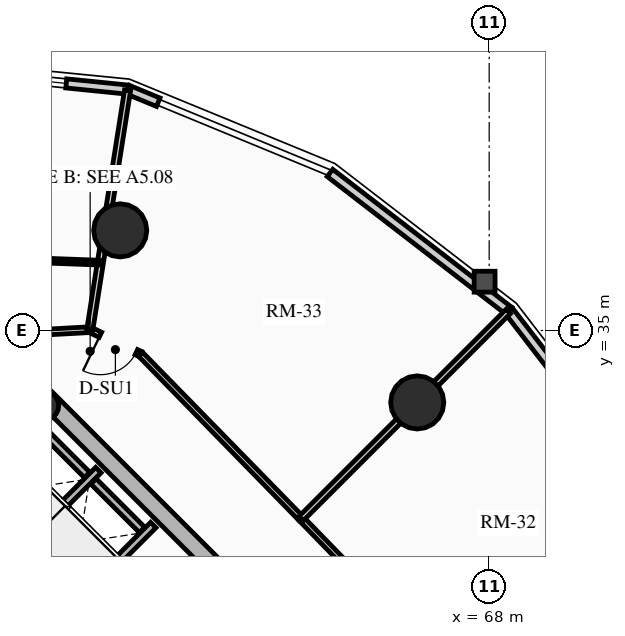
"""IFC4 building model, lengths in metres.
Left out: names, types, materials, properties, quantities, classifications, styles, units other than length and angle.
Written with IfcOpenShell. Run it as: python <this file> out.ifc"""

import sys

from ifc_helpers import new_model, si_unit, direction, frame, frame_2d, origin, origin_2d, place, context, subcontext, project, spatial, rectangle, circle, hollow_circle, extrude, source, transform, mapped, element, fill, save


model = new_model("IFC4")
c1 = context("Model", 3, precision=1e-05, world=origin(), true_north=direction((0.0, 1.0)))
c2 = subcontext(c1, "Body", "Model", "MODEL_VIEW")
j1 = project(units=[si_unit("LENGTHUNIT", "METRE"), si_unit("PLANEANGLEUNIT", "RADIAN")], contexts=[c1])
p1 = place(None, origin())
s1 = spatial("IfcSite", under=j1, at=p1, CompositionType="ELEMENT")
p2 = place(p1, origin())
s2 = spatial("IfcBuilding", under=s1, at=p2, CompositionType="ELEMENT")
p3 = place(p2, frame((0.0, 0.0, 90.52)))
s3 = spatial("IfcBuildingStorey", under=s2, at=p3, CompositionType="ELEMENT", Elevation=90.52)
p4 = place(p3, frame((66.303, 23.263, 0.0), z_axis=(0.0, 0.0, 1.0), x_axis=(-0.707106781187, 0.707106781187, 0.0)))
e1 = element("IfcWall", 1, at=p4, inside=s3, PredefinedType="SHEAR", context=c2, shape_type="SweptSolid", body=[
    extrude(rectangle(XDim=14.2, YDim=0.45, at=frame_2d((7.1, 0.0))), origin(), (0.0, 0.0, 1.0), 2.91),
])
p5 = place(p3, frame((48.856, 25.578, 0.0), z_axis=(0.0, 0.0, 1.0), x_axis=(0.707106781187, 0.707106781187, 0.0)))
e2 = element("IfcWall", 2, at=p5, inside=s3, PredefinedType="SHEAR", context=c2, shape_type="SweptSolid", body=[
    extrude(rectangle(XDim=10.7, YDim=0.45, at=frame_2d((5.35, 0.0))), origin(), (0.0, 0.0, 1.0), 2.91),
])
m1 = source(origin(), c2, "Body", "SweptSolid", [
    extrude(rectangle(XDim=1.5, YDim=2.02, at=frame_2d((0.75, 1.01))), frame((0.0, 0.235, 0.0), z_axis=(0.0, -1.0, 0.0), x_axis=(1.0, 0.0, 0.0)), (0.0, 0.0, 1.0), 0.47),
])
p6 = place(p5, frame((4.6, 0.0, 0.0)))
e3 = element("IfcOpeningElement", 3, at=p6, cuts=e2, PredefinedType="OPENING", context=c2, shape_type="MappedRepresentation", body=[
    mapped(m1, transform((0.0, 0.0, 0.0), x_axis=(1.0, 0.0, 0.0), y_axis=(0.0, 1.0, 0.0), z_axis=(0.0, 0.0, 1.0), scale=1.0)),
])
p7 = place(p3, frame((63.645, 20.922, 0.0), z_axis=(0.0, 0.0, 1.0), x_axis=(-0.707106781187, 0.707106781187, 0.0)))
e4 = element("IfcWall", 4, at=p7, inside=s3, PredefinedType="SHEAR", context=c2, shape_type="SweptSolid", body=[
    extrude(rectangle(XDim=13.75, YDim=0.35, at=frame_2d((6.875, 0.0))), origin(), (0.0, 0.0, 1.0), 2.91),
])
m2 = source(origin(), c2, "Body", "SweptSolid", [
    extrude(rectangle(XDim=1.1, YDim=2.015, at=frame_2d((0.55, 1.007))), frame((0.0, 0.185, 0.0), z_axis=(0.0, -1.0, 0.0), x_axis=(1.0, 0.0, 0.0)), (0.0, 0.0, 1.0), 0.37),
])
p8 = place(p7, frame((10.0, 0.0, 0.0)))
e5 = element("IfcOpeningElement", 5, at=p8, cuts=e4, PredefinedType="OPENING", context=c2, shape_type="MappedRepresentation", body=[
    mapped(m2, transform((0.0, 0.0, 0.0), x_axis=(1.0, 0.0, 0.0), y_axis=(0.0, 1.0, 0.0), z_axis=(0.0, 0.0, 1.0), scale=1.0)),
])
p9 = place(p7, frame((12.0, 0.0, 0.0)))
e6 = element("IfcOpeningElement", 6, at=p9, cuts=e4, PredefinedType="OPENING", context=c2, shape_type="MappedRepresentation", body=[
    mapped(m2, transform((0.0, 0.0, 0.0), x_axis=(1.0, 0.0, 0.0), y_axis=(0.0, 1.0, 0.0), z_axis=(0.0, 0.0, 1.0), scale=1.0)),
])
m3 = source(origin(), c2, "Body", "SweptSolid", [
    extrude(rectangle(XDim=1.15, YDim=2.02, at=frame_2d((0.575, 1.01))), frame((0.0, 0.185, 0.0), z_axis=(0.0, -1.0, 0.0), x_axis=(1.0, 0.0, 0.0)), (0.0, 0.0, 1.0), 0.37),
])
p10 = place(p7, frame((5.305, 0.0, 0.0)))
e7 = element("IfcOpeningElement", 7, at=p10, cuts=e4, PredefinedType="OPENING", context=c2, shape_type="MappedRepresentation", body=[
    mapped(m3, transform((0.0, 0.0, 0.0), x_axis=(1.0, 0.0, 0.0), y_axis=(0.0, 1.0, 0.0), z_axis=(0.0, 0.0, 1.0), scale=1.0)),
])
p11 = place(p3, frame((56.294, 33.024, 0.0), z_axis=(0.0, 0.0, 1.0), x_axis=(0.707106781187, 0.707106781187, 0.0)))
e8 = element("IfcColumn", 8, at=p11, inside=s3, PredefinedType="COLUMN", context=c2, shape_type="SweptSolid", body=[
    extrude(hollow_circle(Radius=0.38, WallThickness=0.032, at=origin_2d()), origin(), (0.0, 0.0, 1.0), 2.91),
])
for number, where, z_axis, x_axis in (
    (9, (66.107, 33.107, 0.0), (0.0, 0.0, 1.0), (1.0, 0.0, 0.0)),
    (10, (58.291, 37.635, 0.0), (0.0, 0.0, 1.0), (1.0, 0.0, 0.0)),
):
    element("IfcColumn", number, at=place(p3, frame(where, z_axis=z_axis, x_axis=x_axis)), inside=s3, PredefinedType="USERDEFINED", context=c2, shape_type="SweptSolid", body=[
        extrude(circle(Radius=0.7, at=origin_2d()), origin(), (0.0, 0.0, 1.0), 2.91),
    ])
p12 = place(p3, frame((63.811, 39.145, 0.0), z_axis=(0.0, 0.0, 1.0), x_axis=(0.791982052206, -0.61054437102, 0.0)))
e11 = element("IfcWall", 11, at=p12, inside=s3, PredefinedType="SOLIDWALL", context=c2, shape_type="SweptSolid", body=[
    extrude(rectangle(XDim=5.942, YDim=0.24, at=frame_2d((2.971, 0.0))), origin(), (0.0, 0.0, 1.0), 2.179),
])
p13 = place(p3, frame((58.487, 41.339, 0.0), z_axis=(0.0, 0.0, 1.0), x_axis=(0.924556017656, -0.381046152345, 0.0)))
e12 = element("IfcWall", 12, at=p13, inside=s3, PredefinedType="SOLIDWALL", context=c2, shape_type="SweptSolid", body=[
    extrude(rectangle(XDim=0.87, YDim=0.24, at=frame_2d((0.435, 0.0))), origin(), (0.0, 0.0, 1.0), 2.179),
])
p14 = place(p3, frame((53.067, 41.885, 0.0), z_axis=(0.0, 0.0, 1.0), x_axis=(0.994971754311, -0.10015591906, 0.0)))
e13 = element("IfcWall", 13, at=p14, inside=s3, PredefinedType="SOLIDWALL", context=c2, shape_type="SweptSolid", body=[
    extrude(rectangle(XDim=5.448, YDim=0.24, at=frame_2d((2.724, 0.0))), origin(), (0.0, 0.0, 1.0), 2.179),
])
m4 = source(origin(), c2, "Body", "SweptSolid", [
    extrude(rectangle(XDim=2.2, YDim=1.35, at=frame_2d((1.1, 0.675))), frame((0.0, 0.13, 0.0), z_axis=(0.0, -1.0, 0.0), x_axis=(1.0, 0.0, 0.0)), (0.0, 0.0, 1.0), 0.26),
])
p15 = place(p14, frame((1.624, 0.0, 0.65)))
e14 = element("IfcOpeningElement", 14, at=p15, cuts=e13, PredefinedType="OPENING", context=c2, shape_type="MappedRepresentation", body=[
    mapped(m4, transform((0.0, 0.0, 0.0), x_axis=(1.0, 0.0, 0.0), y_axis=(0.0, 1.0, 0.0), z_axis=(0.0, 0.0, 1.0), scale=1.0)),
])
p16 = place(p3, frame((68.517, 35.517, 0.0), z_axis=(0.0, 0.0, 1.0), x_axis=(0.61054437102, -0.791982052206, 0.0)))
e15 = element("IfcWall", 15, at=p16, inside=s3, PredefinedType="SOLIDWALL", context=c2, shape_type="SweptSolid", body=[
    extrude(rectangle(XDim=5.942, YDim=0.24, at=frame_2d((2.971, 0.0))), origin(), (0.0, 0.0, 1.0), 2.179),
])
m5 = source(origin(), c2, "Body", "SweptSolid", [
    extrude(rectangle(XDim=1.9, YDim=1.35, at=frame_2d((0.95, 0.675))), frame((0.0, 0.13, 0.0), z_axis=(0.0, -1.0, 0.0), x_axis=(1.0, 0.0, 0.0)), (0.0, 0.0, 1.0), 0.26),
])
p17 = place(p16, frame((2.021, 0.0, 0.65)))
e16 = element("IfcOpeningElement", 16, at=p17, cuts=e15, PredefinedType="OPENING", context=c2, shape_type="MappedRepresentation", body=[
    mapped(m5, transform((0.0, 0.0, 0.0), x_axis=(1.0, 0.0, 0.0), y_axis=(0.0, 1.0, 0.0), z_axis=(0.0, 0.0, 1.0), scale=1.0)),
])
p18 = place(p3, frame((57.062, 27.781, 0.0), z_axis=(0.0, 0.0, 1.0), x_axis=(0.707106781187, 0.707106781187, 0.0)))
e17 = element("IfcWall", 17, at=p18, inside=s3, PredefinedType="SHEAR", context=c2, shape_type="SweptSolid", body=[
    extrude(rectangle(XDim=2.97, YDim=0.2, at=frame_2d((1.485, 0.0))), origin(), (0.0, 0.0, 1.0), 2.91),
])
p19 = place(p3, frame((55.615, 29.227, 0.0), z_axis=(0.0, 0.0, 1.0), x_axis=(0.707147878904, 0.70706568108, 0.0)))
e18 = element("IfcWall", 18, at=p19, inside=s3, PredefinedType="SHEAR", context=c2, shape_type="SweptSolid", body=[
    extrude(rectangle(XDim=2.97, YDim=0.2, at=frame_2d((1.485, 0.0))), origin(), (0.0, 0.0, 1.0), 2.91),
])
p20 = place(p3, frame((58.865, 29.754, 0.0), z_axis=(0.0, 0.0, 1.0), x_axis=(-0.707174411312, 0.707039144592, 0.0)))
e19 = element("IfcWall", 19, at=p20, inside=s3, PredefinedType="SHEAR", context=c2, shape_type="SweptSolid", body=[
    extrude(rectangle(XDim=1.805, YDim=0.2, at=frame_2d((0.902, 0.0))), origin(), (0.0, 0.0, 1.0), 2.91),
])
p21 = place(p3, frame((57.419, 31.2, 0.0), z_axis=(0.0, 0.0, 1.0), x_axis=(-0.707032117043, 0.707181437447, 0.0)))
e20 = element("IfcWall", 20, at=p21, inside=s3, PredefinedType="SHEAR", context=c2, shape_type="SweptSolid", body=[
    extrude(rectangle(XDim=1.635, YDim=0.2, at=frame_2d((0.817, 0.0))), origin(), (0.0, 0.0, 1.0), 2.91),
])
p22 = place(p3, frame((63.051, 30.051, 0.0), z_axis=(0.0, 0.0, 1.0), x_axis=(-0.698846622234, 0.715271555839, 0.0)))
e21 = element("IfcWall", 21, at=p22, inside=s3, PredefinedType="PARTITIONING", context=c2, shape_type="SweptSolid", body=[
    extrude(rectangle(XDim=6.05, YDim=0.15, at=frame_2d((3.025, 0.0))), origin(), (0.0, 0.0, 1.0), 2.225),
])
p23 = place(p3, frame((58.823, 34.378, 0.0), z_axis=(0.0, 0.0, 1.0), x_axis=(-0.900449137666, 0.434961320668, 0.0)))
e22 = element("IfcWall", 22, at=p23, inside=s3, PredefinedType="PARTITIONING", context=c2, shape_type="SweptSolid", body=[
    extrude(rectangle(XDim=1.479, YDim=0.15, at=frame_2d((0.74, 0.0))), origin(), (0.0, 0.0, 1.0), 2.225),
])
m6 = source(origin(), c2, "Body", "SweptSolid", [
    extrude(rectangle(XDim=1.05, YDim=2.015, at=frame_2d((0.525, 1.007))), frame((0.0, 0.085, 0.0), z_axis=(0.0, -1.0, 0.0), x_axis=(1.0, 0.0, 0.0)), (0.0, 0.0, 1.0), 0.17),
])
p24 = place(p23, frame((0.12, 0.0, 0.0)))
e23 = element("IfcOpeningElement", 23, at=p24, cuts=e22, PredefinedType="OPENING", context=c2, shape_type="MappedRepresentation", body=[
    mapped(m6, transform((0.0, 0.0, 0.0), x_axis=(1.0, 0.0, 0.0), y_axis=(0.0, 1.0, 0.0), z_axis=(0.0, 0.0, 1.0), scale=1.0)),
])
p25 = place(p3, frame((57.491, 35.021, 0.0), z_axis=(0.0, 0.0, 1.0), x_axis=(-0.9985194771, -0.054395347698, 0.0)))
e24 = element("IfcWall", 24, at=p25, inside=s3, PredefinedType="PARTITIONING", context=c2, shape_type="SweptSolid", body=[
    extrude(rectangle(XDim=1.472, YDim=0.15, at=frame_2d((0.736, 0.0))), origin(), (0.0, 0.0, 1.0), 2.225),
])
p26 = place(p3, frame((67.19, 25.791, 0.0), z_axis=(0.0, 0.0, 1.0), x_axis=(-0.696839457851, 0.717227139742, 0.0)))
e25 = element("IfcWall", 25, at=p26, inside=s3, PredefinedType="PARTITIONING", context=c2, shape_type="SweptSolid", body=[
    extrude(rectangle(XDim=5.939, YDim=0.15, at=frame_2d((2.97, 0.0))), origin(), (0.0, 0.0, 1.0), 2.655),
])
p27 = place(p3, frame((63.051, 30.051, 0.0), z_axis=(0.0, 0.0, 1.0), x_axis=(0.707106781187, 0.707106781187, 0.0)))
e26 = element("IfcWall", 26, at=p27, inside=s3, PredefinedType="PARTITIONING", context=c2, shape_type="SweptSolid", body=[
    extrude(rectangle(XDim=7.711, YDim=0.16, at=frame_2d((3.855, 0.0))), origin(), (0.0, 0.0, 1.0), 2.179),
])
p28 = place(p3, frame((57.491, 35.021, 0.0), z_axis=(0.0, 0.0, 1.0), x_axis=(0.155805268746, 0.98778779008, 0.0)))
e27 = element("IfcWall", 27, at=p28, inside=s3, PredefinedType="PARTITIONING", context=c2, shape_type="SweptSolid", body=[
    extrude(rectangle(XDim=6.376, YDim=0.16, at=frame_2d((3.188, 0.0))), origin(), (0.0, 0.0, 1.0), 2.179),
])
p29 = place(p3, frame((57.769, 36.785, 0.0), z_axis=(0.0, 0.0, 1.0), x_axis=(-0.999316779648, 0.036959084311, 0.0)))
e28 = element("IfcWall", 28, at=p29, inside=s3, PredefinedType="PARTITIONING", context=c2, shape_type="SweptSolid", body=[
    extrude(rectangle(XDim=2.576, YDim=0.125, at=frame_2d((1.288, 0.0))), origin(), (0.0, 0.0, 1.0), 2.292),
])
m7 = source(origin(), c2, "Body", "SweptSolid", [
    extrude(rectangle(XDim=2.2, YDim=1.35, at=frame_2d((1.1, 0.675))), frame((0.0, 0.03, 0.0), z_axis=(0.0, -1.0, 0.0), x_axis=(1.0, 0.0, 0.0)), (0.0, 0.0, 1.0), 0.06),
])
p30 = place(p15, origin())
e29 = element("IfcWindow", 29, at=p30, inside=s3, PartitioningType="DOUBLE_PANEL_VERTICAL", PredefinedType="WINDOW", context=c2, shape_type="MappedRepresentation", body=[
    mapped(m7, transform((0.0, 0.0, 0.0), x_axis=(1.0, 0.0, 0.0), y_axis=(0.0, 1.0, 0.0), z_axis=(0.0, 0.0, 1.0), scale=1.0)),
])
fill(e14, e29)
m8 = source(origin(), c2, "Body", "SweptSolid", [
    extrude(rectangle(XDim=1.05, YDim=2.015, at=frame_2d((0.525, 1.007))), frame((0.0, 0.025, 0.0), z_axis=(0.0, -1.0, 0.0), x_axis=(1.0, 0.0, 0.0)), (0.0, 0.0, 1.0), 0.05),
])
p31 = place(p24, origin())
e30 = element("IfcDoor", 30, at=p31, inside=s3, OperationType="SINGLE_SWING_RIGHT", PredefinedType="DOOR", context=c2, shape_type="MappedRepresentation", body=[
    mapped(m8, transform((0.0, 0.0, 0.0), x_axis=(1.0, 0.0, 0.0), y_axis=(0.0, 1.0, 0.0), z_axis=(0.0, 0.0, 1.0), scale=1.0)),
])
fill(e23, e30)
save(model, sys.argv[1])
